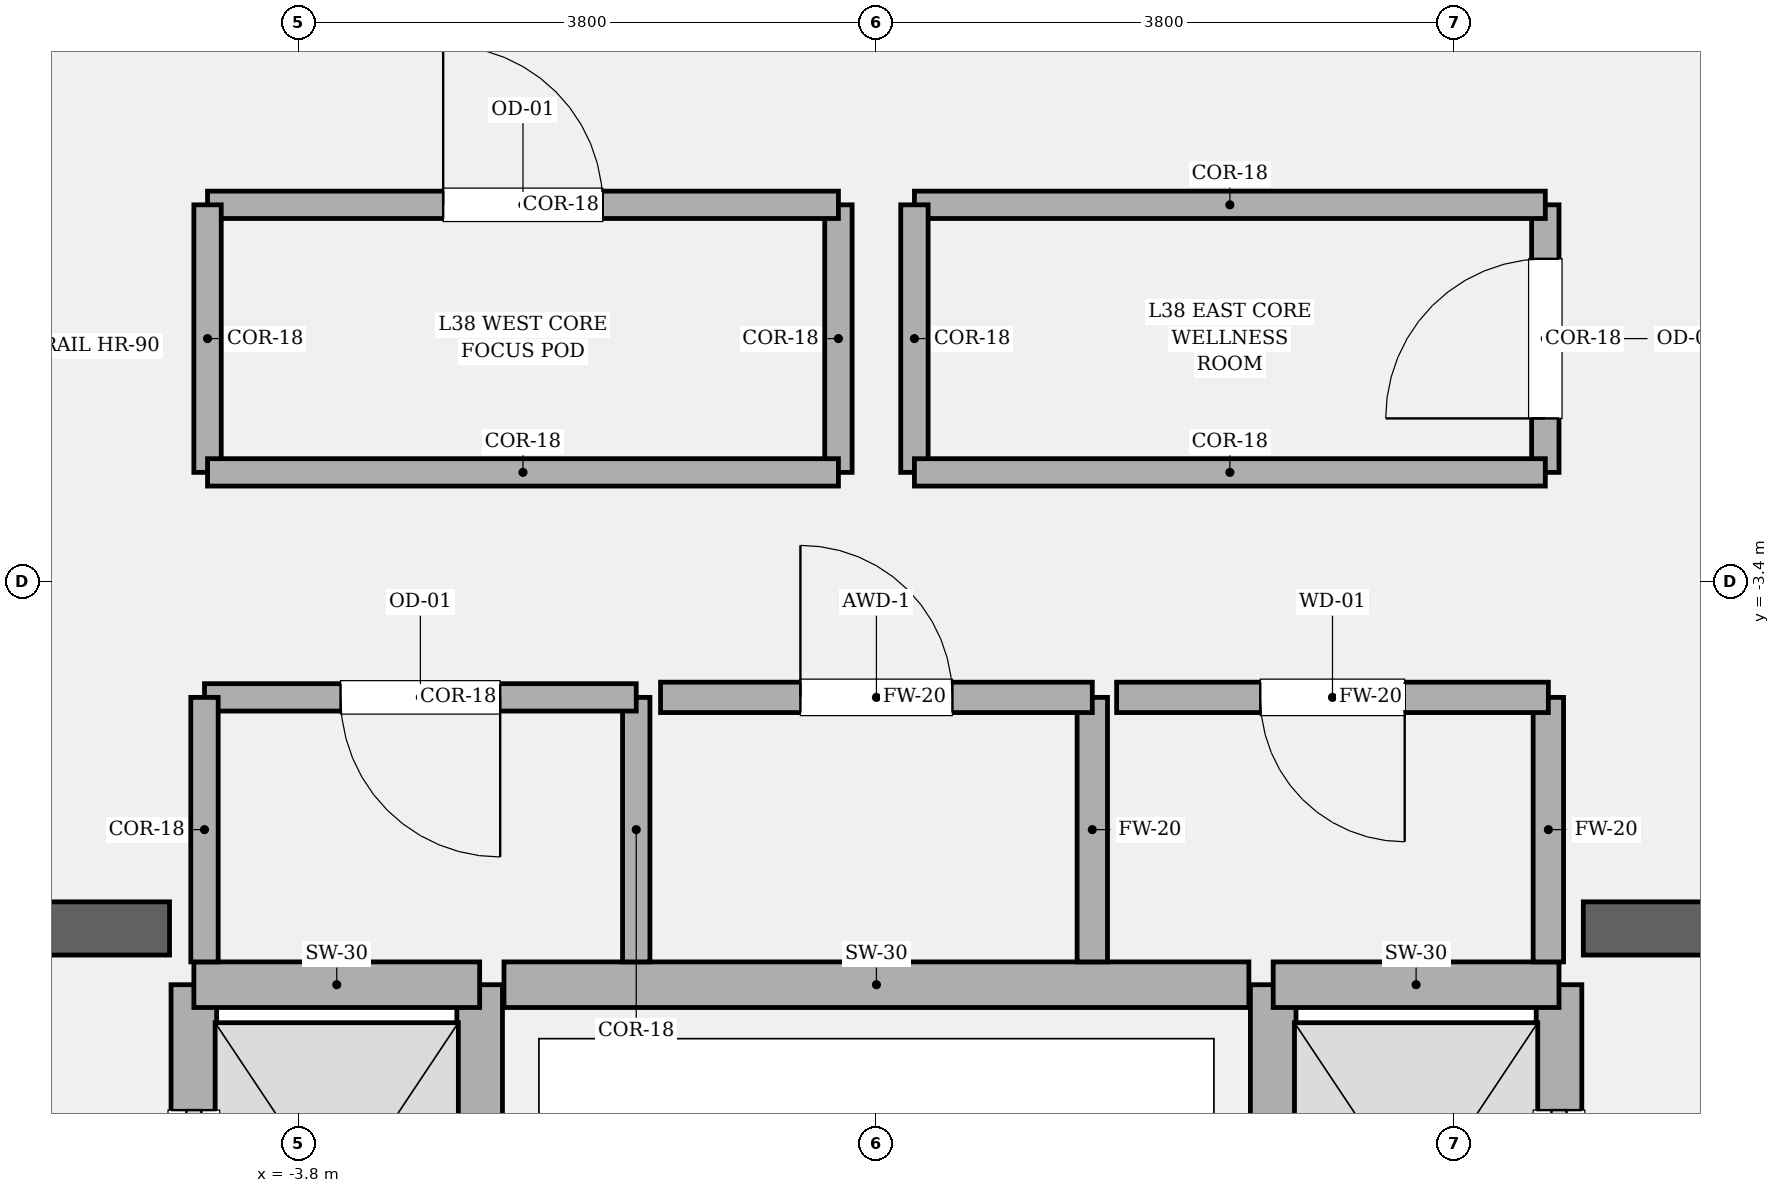
"""IFC4 building model, lengths in metres.
Left out: names, types, materials, properties, quantities, classifications, styles, units other than length and angle.
Written with IfcOpenShell. Run it as: python <this file> out.ifc"""

import sys

from ifc_helpers import new_model, si_unit, direction, frame, frame_2d, origin, place, context, subcontext, project, spatial, rectangle, extrude, element, fill, save


model = new_model("IFC4")
c1 = context("Model", 3, precision=1e-05, world=origin(), true_north=direction((0.0, 1.0)))
c2 = subcontext(c1, "Body", "Model", "MODEL_VIEW")
j1 = project(units=[si_unit("LENGTHUNIT", "METRE"), si_unit("PLANEANGLEUNIT", "RADIAN")], contexts=[c1])
p1 = place(None, origin())
s1 = spatial("IfcSite", under=j1, at=p1, CompositionType="ELEMENT")
p2 = place(p1, origin())
s2 = spatial("IfcBuilding", under=s1, at=p2, CompositionType="ELEMENT")
p3 = place(p2, frame((0.0, 0.0, 164.1)))
s3 = spatial("IfcBuildingStorey", under=s2, at=p3, CompositionType="ELEMENT", Elevation=164.1)
p4 = place(p3, frame((-9.875, -5.68, 0.0), z_axis=(0.0, 0.0, 1.0), x_axis=(1.0, 0.0, 0.0)))
e1 = element("IfcWall", 1, at=p4, inside=s3, PredefinedType="SOLIDWALL", context=c2, shape_type="SweptSolid", body=[
    extrude(rectangle(XDim=5.225, YDim=0.35, at=frame_2d((2.613, 0.0))), origin(), (0.0, 0.0, 1.0), 4.05),
])
p5 = place(p4, frame((1.335, 0.0, 0.0)))
e2 = element("IfcOpeningElement", 2, at=p5, cuts=e1, PredefinedType="OPENING", context=c2, shape_type="SweptSolid", body=[
    extrude(rectangle(XDim=1.18, YDim=2.2, at=frame_2d((0.59, 1.1))), frame((0.0, 0.185, 0.0), z_axis=(0.0, -1.0, 0.0), x_axis=(1.0, 0.0, 0.0)), (0.0, 0.0, 1.0), 0.37),
])
p6 = place(p3, frame((4.65, -5.68, 0.0), z_axis=(0.0, 0.0, 1.0), x_axis=(1.0, 0.0, 0.0)))
e3 = element("IfcWall", 3, at=p6, inside=s3, PredefinedType="SOLIDWALL", context=c2, shape_type="SweptSolid", body=[
    extrude(rectangle(XDim=5.225, YDim=0.35, at=frame_2d((2.613, 0.0))), origin(), (0.0, 0.0, 1.0), 4.05),
])
p7 = place(p6, frame((2.71, 0.0, 0.0)))
e4 = element("IfcOpeningElement", 4, at=p7, cuts=e3, PredefinedType="OPENING", context=c2, shape_type="SweptSolid", body=[
    extrude(rectangle(XDim=1.18, YDim=2.2, at=frame_2d((0.59, 1.1))), frame((0.0, 0.185, 0.0), z_axis=(0.0, -1.0, 0.0), x_axis=(1.0, 0.0, 0.0)), (0.0, 0.0, 1.0), 0.37),
])
p8 = place(p3, frame((-4.49, -8.82, 0.0), z_axis=(0.0, 0.0, 1.0), x_axis=(0.0, 1.0, 0.0)))
e5 = element("IfcWall", 5, at=p8, inside=s3, PredefinedType="SOLIDWALL", context=c2, shape_type="SweptSolid", body=[
    extrude(rectangle(XDim=2.77, YDim=0.3, at=frame_2d((1.385, 0.0))), origin(), (0.0, 0.0, 1.0), 3.83),
])
p9 = place(p8, frame((0.825, 0.0, 0.0)))
e6 = element("IfcOpeningElement", 6, at=p9, cuts=e5, PredefinedType="OPENING", context=c2, shape_type="SweptSolid", body=[
    extrude(rectangle(XDim=1.12, YDim=2.25, at=frame_2d((0.56, 1.125))), frame((0.0, 0.16, 0.0), z_axis=(0.0, -1.0, 0.0), x_axis=(1.0, 0.0, 0.0)), (0.0, 0.0, 1.0), 0.32),
])
p10 = place(p3, frame((-2.61, -8.82, 0.0), z_axis=(0.0, 0.0, 1.0), x_axis=(0.0, 1.0, 0.0)))
e7 = element("IfcWall", 7, at=p10, inside=s3, PredefinedType="SOLIDWALL", context=c2, shape_type="SweptSolid", body=[
    extrude(rectangle(XDim=2.77, YDim=0.3, at=frame_2d((1.385, 0.0))), origin(), (0.0, 0.0, 1.0), 3.83),
])
p11 = place(p3, frame((-4.49, -6.05, 0.0), z_axis=(0.0, 0.0, 1.0), x_axis=(1.0, 0.0, 0.0)))
e8 = element("IfcWall", 8, at=p11, inside=s3, PredefinedType="SOLIDWALL", context=c2, shape_type="SweptSolid", body=[
    extrude(rectangle(XDim=1.88, YDim=0.3, at=frame_2d((0.94, 0.0))), origin(), (0.0, 0.0, 1.0), 3.83),
])
p12 = place(p3, frame((4.49, -8.82, 0.0), z_axis=(0.0, 0.0, 1.0), x_axis=(0.0, 1.0, 0.0)))
e9 = element("IfcWall", 9, at=p12, inside=s3, PredefinedType="SOLIDWALL", context=c2, shape_type="SweptSolid", body=[
    extrude(rectangle(XDim=2.77, YDim=0.3, at=frame_2d((1.385, 0.0))), origin(), (0.0, 0.0, 1.0), 3.83),
])
p13 = place(p12, frame((0.825, 0.0, 0.0)))
e10 = element("IfcOpeningElement", 10, at=p13, cuts=e9, PredefinedType="OPENING", context=c2, shape_type="SweptSolid", body=[
    extrude(rectangle(XDim=1.12, YDim=2.25, at=frame_2d((0.56, 1.125))), frame((0.0, 0.16, 0.0), z_axis=(0.0, -1.0, 0.0), x_axis=(1.0, 0.0, 0.0)), (0.0, 0.0, 1.0), 0.32),
])
p14 = place(p3, frame((2.61, -8.82, 0.0), z_axis=(0.0, 0.0, 1.0), x_axis=(0.0, 1.0, 0.0)))
e11 = element("IfcWall", 11, at=p14, inside=s3, PredefinedType="SOLIDWALL", context=c2, shape_type="SweptSolid", body=[
    extrude(rectangle(XDim=2.77, YDim=0.3, at=frame_2d((1.385, 0.0))), origin(), (0.0, 0.0, 1.0), 3.83),
])
p15 = place(p3, frame((2.61, -6.05, 0.0), z_axis=(0.0, 0.0, 1.0), x_axis=(1.0, 0.0, 0.0)))
e12 = element("IfcWall", 12, at=p15, inside=s3, PredefinedType="SOLIDWALL", context=c2, shape_type="SweptSolid", body=[
    extrude(rectangle(XDim=1.88, YDim=0.3, at=frame_2d((0.94, 0.0))), origin(), (0.0, 0.0, 1.0), 3.83),
])
p16 = place(p3, frame((-2.45, -6.05, 0.0), z_axis=(0.0, 0.0, 1.0), x_axis=(1.0, 0.0, 0.0)))
e13 = element("IfcWall", 13, at=p16, inside=s3, PredefinedType="SOLIDWALL", context=c2, shape_type="SweptSolid", body=[
    extrude(rectangle(XDim=4.9, YDim=0.3, at=frame_2d((2.45, 0.0))), origin(), (0.0, 0.0, 1.0), 3.83),
])
p17 = place(p3, frame((-1.58, -5.9, 0.0), z_axis=(0.0, 0.0, 1.0), x_axis=(0.0, 1.0, 0.0)))
e14 = element("IfcWall", 14, at=p17, inside=s3, PredefinedType="PARTITIONING", context=c2, shape_type="SweptSolid", body=[
    extrude(rectangle(XDim=1.74, YDim=0.18, at=frame_2d((0.87, 0.0))), origin(), (0.0, 0.0, 1.0), 3.83),
])
p18 = place(p3, frame((-1.58, -4.16, 0.0), z_axis=(0.0, 0.0, 1.0), x_axis=(-1.0, 0.0, 0.0)))
e15 = element("IfcWall", 15, at=p18, inside=s3, PredefinedType="PARTITIONING", context=c2, shape_type="SweptSolid", body=[
    extrude(rectangle(XDim=2.84, YDim=0.18, at=frame_2d((1.42, 0.0))), origin(), (0.0, 0.0, 1.0), 3.83),
])
p19 = place(p18, frame((0.895, 0.0, 0.0)))
e16 = element("IfcOpeningElement", 16, at=p19, cuts=e15, PredefinedType="OPENING", context=c2, shape_type="SweptSolid", body=[
    extrude(rectangle(XDim=1.05, YDim=2.2, at=frame_2d((0.525, 1.1))), frame((0.0, 0.1, 0.0), z_axis=(0.0, -1.0, 0.0), x_axis=(1.0, 0.0, 0.0)), (0.0, 0.0, 1.0), 0.2),
])
p20 = place(p3, frame((-4.42, -4.16, 0.0), z_axis=(0.0, 0.0, 1.0), x_axis=(0.0, -1.0, 0.0)))
e17 = element("IfcWall", 17, at=p20, inside=s3, PredefinedType="PARTITIONING", context=c2, shape_type="SweptSolid", body=[
    extrude(rectangle(XDim=1.74, YDim=0.18, at=frame_2d((0.87, 0.0))), origin(), (0.0, 0.0, 1.0), 3.83),
])
p21 = place(p3, frame((1.42, -5.9, 0.0), z_axis=(0.0, 0.0, 1.0), x_axis=(0.0, 1.0, 0.0)))
e18 = element("IfcWall", 18, at=p21, inside=s3, PredefinedType="SOLIDWALL", context=c2, shape_type="SweptSolid", body=[
    extrude(rectangle(XDim=1.74, YDim=0.2, at=frame_2d((0.87, 0.0))), origin(), (0.0, 0.0, 1.0), 3.83),
])
p22 = place(p3, frame((1.42, -4.16, 0.0), z_axis=(0.0, 0.0, 1.0), x_axis=(-1.0, 0.0, 0.0)))
e19 = element("IfcWall", 19, at=p22, inside=s3, PredefinedType="SOLIDWALL", context=c2, shape_type="SweptSolid", body=[
    extrude(rectangle(XDim=2.84, YDim=0.2, at=frame_2d((1.42, 0.0))), origin(), (0.0, 0.0, 1.0), 3.83),
])
p23 = place(p22, frame((0.92, 0.0, 0.0)))
e20 = element("IfcOpeningElement", 20, at=p23, cuts=e19, PredefinedType="OPENING", context=c2, shape_type="SweptSolid", body=[
    extrude(rectangle(XDim=1.0, YDim=2.15, at=frame_2d((0.5, 1.075))), frame((0.0, 0.11, 0.0), z_axis=(0.0, -1.0, 0.0), x_axis=(1.0, 0.0, 0.0)), (0.0, 0.0, 1.0), 0.22),
])
p24 = place(p3, frame((4.42, -5.9, 0.0), z_axis=(0.0, 0.0, 1.0), x_axis=(0.0, 1.0, 0.0)))
e21 = element("IfcWall", 21, at=p24, inside=s3, PredefinedType="SOLIDWALL", context=c2, shape_type="SweptSolid", body=[
    extrude(rectangle(XDim=1.74, YDim=0.2, at=frame_2d((0.87, 0.0))), origin(), (0.0, 0.0, 1.0), 3.83),
])
p25 = place(p3, frame((4.42, -4.16, 0.0), z_axis=(0.0, 0.0, 1.0), x_axis=(-1.0, 0.0, 0.0)))
e22 = element("IfcWall", 22, at=p25, inside=s3, PredefinedType="SOLIDWALL", context=c2, shape_type="SweptSolid", body=[
    extrude(rectangle(XDim=2.84, YDim=0.2, at=frame_2d((1.42, 0.0))), origin(), (0.0, 0.0, 1.0), 3.83),
])
p26 = place(p25, frame((0.945, 0.0, 0.0)))
e23 = element("IfcOpeningElement", 23, at=p26, cuts=e22, PredefinedType="OPENING", context=c2, shape_type="SweptSolid", body=[
    extrude(rectangle(XDim=0.95, YDim=2.15, at=frame_2d((0.475, 1.075))), frame((0.0, 0.11, 0.0), z_axis=(0.0, -1.0, 0.0), x_axis=(1.0, 0.0, 0.0)), (0.0, 0.0, 1.0), 0.22),
])
p27 = place(p3, frame((-0.25, -2.68, 0.0), z_axis=(0.0, 0.0, 1.0), x_axis=(0.0, 1.0, 0.0)))
e24 = element("IfcWall", 24, at=p27, inside=s3, PredefinedType="PARTITIONING", context=c2, shape_type="SweptSolid", body=[
    extrude(rectangle(XDim=1.76, YDim=0.18, at=frame_2d((0.88, 0.0))), origin(), (0.0, 0.0, 1.0), 3.83),
])
p28 = place(p3, frame((-0.25, -0.92, 0.0), z_axis=(0.0, 0.0, 1.0), x_axis=(-1.0, 0.0, 0.0)))
e25 = element("IfcWall", 25, at=p28, inside=s3, PredefinedType="PARTITIONING", context=c2, shape_type="SweptSolid", body=[
    extrude(rectangle(XDim=4.15, YDim=0.18, at=frame_2d((2.075, 0.0))), origin(), (0.0, 0.0, 1.0), 3.83),
])
p29 = place(p28, frame((1.55, 0.0, 0.0)))
e26 = element("IfcOpeningElement", 26, at=p29, cuts=e25, PredefinedType="OPENING", context=c2, shape_type="SweptSolid", body=[
    extrude(rectangle(XDim=1.05, YDim=2.2, at=frame_2d((0.525, 1.1))), frame((0.0, 0.1, 0.0), z_axis=(0.0, -1.0, 0.0), x_axis=(1.0, 0.0, 0.0)), (0.0, 0.0, 1.0), 0.2),
])
p30 = place(p3, frame((-4.4, -0.92, 0.0), z_axis=(0.0, 0.0, 1.0), x_axis=(0.0, -1.0, 0.0)))
e27 = element("IfcWall", 27, at=p30, inside=s3, PredefinedType="PARTITIONING", context=c2, shape_type="SweptSolid", body=[
    extrude(rectangle(XDim=1.76, YDim=0.18, at=frame_2d((0.88, 0.0))), origin(), (0.0, 0.0, 1.0), 3.83),
])
p31 = place(p3, frame((-4.4, -2.68, 0.0), z_axis=(0.0, 0.0, 1.0), x_axis=(1.0, 0.0, 0.0)))
e28 = element("IfcWall", 28, at=p31, inside=s3, PredefinedType="PARTITIONING", context=c2, shape_type="SweptSolid", body=[
    extrude(rectangle(XDim=4.15, YDim=0.18, at=frame_2d((2.075, 0.0))), origin(), (0.0, 0.0, 1.0), 3.83),
])
p32 = place(p3, frame((4.4, -2.68, 0.0), z_axis=(0.0, 0.0, 1.0), x_axis=(0.0, 1.0, 0.0)))
e29 = element("IfcWall", 29, at=p32, inside=s3, PredefinedType="PARTITIONING", context=c2, shape_type="SweptSolid", body=[
    extrude(rectangle(XDim=1.76, YDim=0.18, at=frame_2d((0.88, 0.0))), origin(), (0.0, 0.0, 1.0), 3.83),
])
p33 = place(p32, frame((0.355, 0.0, 0.0)))
e30 = element("IfcOpeningElement", 30, at=p33, cuts=e29, PredefinedType="OPENING", context=c2, shape_type="SweptSolid", body=[
    extrude(rectangle(XDim=1.05, YDim=2.2, at=frame_2d((0.525, 1.1))), frame((0.0, 0.1, 0.0), z_axis=(0.0, -1.0, 0.0), x_axis=(1.0, 0.0, 0.0)), (0.0, 0.0, 1.0), 0.2),
])
p34 = place(p3, frame((4.4, -0.92, 0.0), z_axis=(0.0, 0.0, 1.0), x_axis=(-1.0, 0.0, 0.0)))
e31 = element("IfcWall", 31, at=p34, inside=s3, PredefinedType="PARTITIONING", context=c2, shape_type="SweptSolid", body=[
    extrude(rectangle(XDim=4.15, YDim=0.18, at=frame_2d((2.075, 0.0))), origin(), (0.0, 0.0, 1.0), 3.83),
])
p35 = place(p3, frame((0.25, -0.92, 0.0), z_axis=(0.0, 0.0, 1.0), x_axis=(0.0, -1.0, 0.0)))
e32 = element("IfcWall", 32, at=p35, inside=s3, PredefinedType="PARTITIONING", context=c2, shape_type="SweptSolid", body=[
    extrude(rectangle(XDim=1.76, YDim=0.18, at=frame_2d((0.88, 0.0))), origin(), (0.0, 0.0, 1.0), 3.83),
])
p36 = place(p3, frame((0.25, -2.68, 0.0), z_axis=(0.0, 0.0, 1.0), x_axis=(1.0, 0.0, 0.0)))
e33 = element("IfcWall", 33, at=p36, inside=s3, PredefinedType="PARTITIONING", context=c2, shape_type="SweptSolid", body=[
    extrude(rectangle(XDim=4.15, YDim=0.18, at=frame_2d((2.075, 0.0))), origin(), (0.0, 0.0, 1.0), 3.83),
])
p37 = place(p9, origin())
e34 = element("IfcDoor", 34, at=p37, inside=s3, OperationType="SLIDING_TO_LEFT", PredefinedType="DOOR", context=c2, shape_type="SweptSolid", body=[
    extrude(rectangle(XDim=1.12, YDim=2.25, at=frame_2d((0.56, 1.125))), frame((0.0, 0.025, 0.0), z_axis=(0.0, -1.0, 0.0), x_axis=(1.0, 0.0, 0.0)), (0.0, 0.0, 1.0), 0.05),
])
fill(e6, e34)
p38 = place(p13, origin())
e35 = element("IfcDoor", 35, at=p38, inside=s3, OperationType="SLIDING_TO_RIGHT", PredefinedType="DOOR", context=c2, shape_type="SweptSolid", body=[
    extrude(rectangle(XDim=1.12, YDim=2.25, at=frame_2d((0.56, 1.125))), frame((0.0, 0.025, 0.0), z_axis=(0.0, -1.0, 0.0), x_axis=(1.0, 0.0, 0.0)), (0.0, 0.0, 1.0), 0.05),
])
fill(e10, e35)
p39 = place(p19, origin())
e36 = element("IfcDoor", 36, at=p39, inside=s3, OperationType="SINGLE_SWING_LEFT", PredefinedType="DOOR", context=c2, shape_type="SweptSolid", body=[
    extrude(rectangle(XDim=1.05, YDim=2.2, at=frame_2d((0.525, 1.1))), frame((0.0, 0.025, 0.0), z_axis=(0.0, -1.0, 0.0), x_axis=(1.0, 0.0, 0.0)), (0.0, 0.0, 1.0), 0.05),
])
fill(e16, e36)
p40 = place(p23, origin())
e37 = element("IfcDoor", 37, at=p40, inside=s3, OperationType="SINGLE_SWING_RIGHT", PredefinedType="DOOR", context=c2, shape_type="SweptSolid", body=[
    extrude(rectangle(XDim=1.0, YDim=2.15, at=frame_2d((0.5, 1.075))), frame((0.0, 0.025, 0.0), z_axis=(0.0, -1.0, 0.0), x_axis=(1.0, 0.0, 0.0)), (0.0, 0.0, 1.0), 0.05),
])
fill(e20, e37)
p41 = place(p26, origin())
e38 = element("IfcDoor", 38, at=p41, inside=s3, OperationType="SINGLE_SWING_LEFT", PredefinedType="DOOR", context=c2, shape_type="SweptSolid", body=[
    extrude(rectangle(XDim=0.95, YDim=2.15, at=frame_2d((0.475, 1.075))), frame((0.0, 0.025, 0.0), z_axis=(0.0, -1.0, 0.0), x_axis=(1.0, 0.0, 0.0)), (0.0, 0.0, 1.0), 0.05),
])
fill(e23, e38)
p42 = place(p29, origin())
e39 = element("IfcDoor", 39, at=p42, inside=s3, OperationType="SINGLE_SWING_RIGHT", PredefinedType="DOOR", context=c2, shape_type="SweptSolid", body=[
    extrude(rectangle(XDim=1.05, YDim=2.2, at=frame_2d((0.525, 1.1))), frame((0.0, 0.025, 0.0), z_axis=(0.0, -1.0, 0.0), x_axis=(1.0, 0.0, 0.0)), (0.0, 0.0, 1.0), 0.05),
])
fill(e26, e39)
p43 = place(p33, origin())
e40 = element("IfcDoor", 40, at=p43, inside=s3, OperationType="SINGLE_SWING_LEFT", PredefinedType="DOOR", context=c2, shape_type="SweptSolid", body=[
    extrude(rectangle(XDim=1.05, YDim=2.2, at=frame_2d((0.525, 1.1))), frame((0.0, 0.025, 0.0), z_axis=(0.0, -1.0, 0.0), x_axis=(1.0, 0.0, 0.0)), (0.0, 0.0, 1.0), 0.05),
])
fill(e30, e40)
save(model, sys.argv[1])
